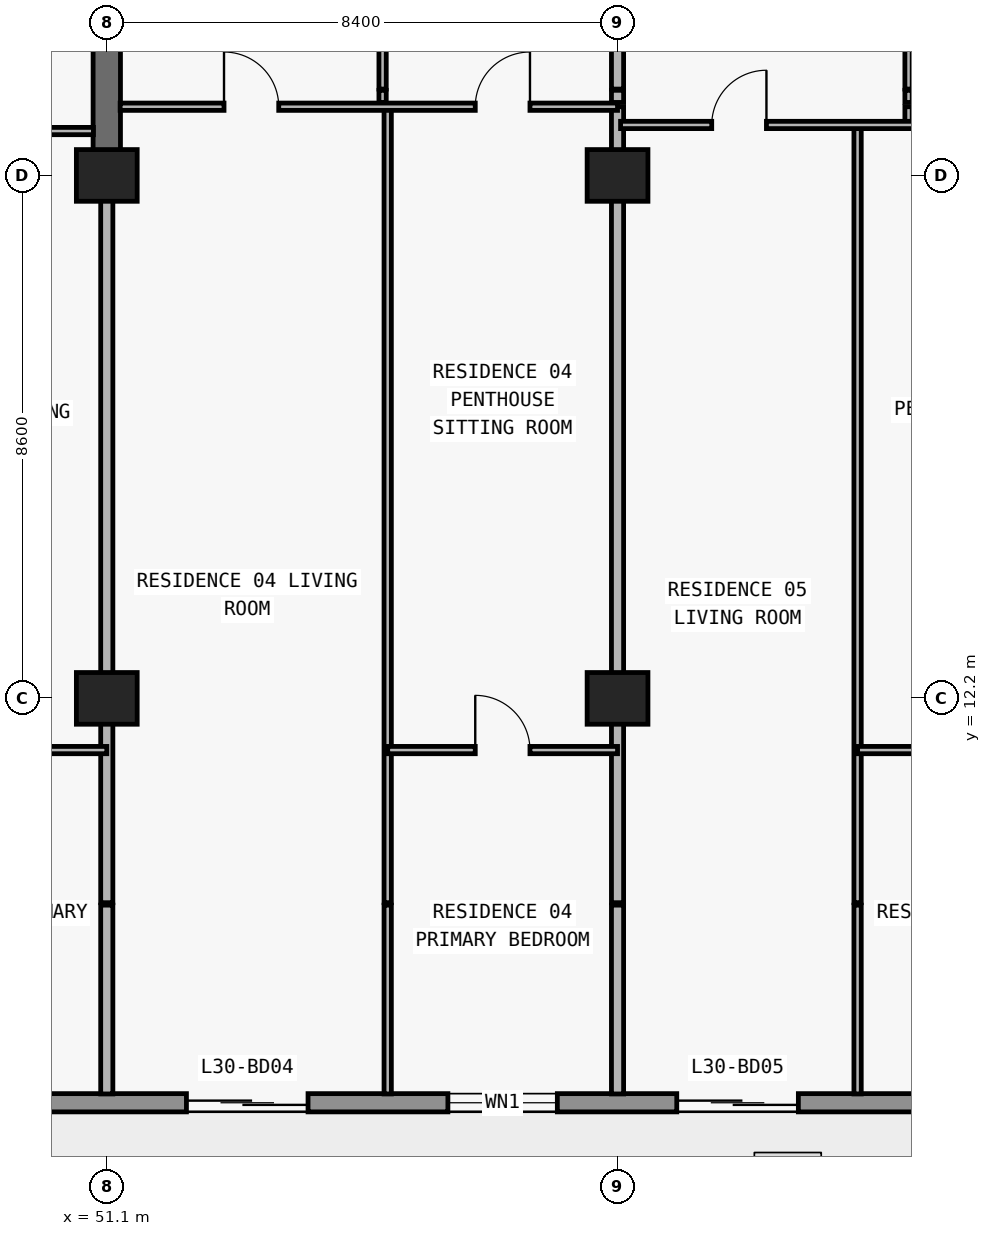
"""IFC4 building model, lengths in metres.
Left out: names, types, materials, properties, quantities, classifications, styles, units other than length and angle.
Written with IfcOpenShell. Run it as: python <this file> out.ifc"""

import sys

from ifc_helpers import new_model, si_unit, direction, frame, frame_2d, origin, origin_2d, place, context, subcontext, project, spatial, rectangle, extrude, element, fill, save


model = new_model("IFC4")
c1 = context("Model", 3, precision=1e-05, world=origin(), true_north=direction((0.0, 1.0)))
c2 = subcontext(c1, "Body", "Model", "MODEL_VIEW")
j1 = project(units=[si_unit("LENGTHUNIT", "METRE"), si_unit("PLANEANGLEUNIT", "RADIAN")], contexts=[c1])
p1 = place(None, origin())
s1 = spatial("IfcSite", under=j1, at=p1, CompositionType="ELEMENT")
p2 = place(p1, origin())
s2 = spatial("IfcBuilding", under=s1, at=p2, CompositionType="ELEMENT")
p3 = place(p2, frame((0.0, 0.0, 112.5)))
s3 = spatial("IfcBuildingStorey", under=s2, at=p3, CompositionType="ELEMENT", Elevation=112.5)
for number, where, z_axis, x_axis in (
    (1, (51.1, 12.2, 0.0), (0.0, 0.0, 1.0), (1.0, 0.0, 0.0)),
    (2, (59.5, 12.2, 0.0), (0.0, 0.0, 1.0), (1.0, 0.0, 0.0)),
    (3, (51.1, 20.8, 0.0), (0.0, 0.0, 1.0), (1.0, 0.0, 0.0)),
    (4, (59.5, 20.8, 0.0), (0.0, 0.0, 1.0), (1.0, 0.0, 0.0)),
):
    element("IfcColumn", number, at=place(p3, frame(where, z_axis=z_axis, x_axis=x_axis)), inside=s3, PredefinedType="COLUMN", context=c2, shape_type="SweptSolid", body=[
        extrude(rectangle(XDim=1.0, YDim=0.85, at=origin_2d()), origin(), (0.0, 0.0, 1.0), 3.05),
    ])
p4 = place(p3, frame((51.1, 20.8, 0.0), z_axis=(0.0, 0.0, 1.0), x_axis=(0.0, 1.0, 0.0)))
e5 = element("IfcWall", 5, at=p4, inside=s3, PredefinedType="SHEAR", context=c2, shape_type="SweptSolid", body=[
    extrude(rectangle(XDim=8.6, YDim=0.45, at=frame_2d((4.3, 0.0))), origin(), (0.0, 0.0, 1.0), 3.05),
])
p5 = place(p3, frame((70.1, 5.55, 0.0), z_axis=(0.0, 0.0, 1.0), x_axis=(-1.0, 0.0, 0.0)))
e6 = element("IfcWall", 6, at=p5, inside=s3, PredefinedType="STANDARD", context=c2, shape_type="SweptSolid", body=[
    extrude(rectangle(XDim=62.4, YDim=0.3, at=frame_2d((31.2, 0.0))), origin(), (0.0, 0.0, 1.0), 3.05),
])
p6 = place(p5, frame((57.29, 0.0, 0.0)))
e7 = element("IfcOpeningElement", 7, at=p6, cuts=e6, PredefinedType="OPENING", context=c2, shape_type="SweptSolid", body=[
    extrude(rectangle(XDim=2.0, YDim=2.3, at=frame_2d((1.0, 1.15))), frame((0.0, 0.16, 0.0), z_axis=(0.0, -1.0, 0.0), x_axis=(1.0, 0.0, 0.0)), (0.0, 0.0, 1.0), 0.32),
])
p7 = place(p5, frame((52.61, 0.0, 0.65)))
e8 = element("IfcOpeningElement", 8, at=p7, cuts=e6, PredefinedType="OPENING", context=c2, shape_type="SweptSolid", body=[
    extrude(rectangle(XDim=2.6, YDim=1.85, at=frame_2d((1.3, 0.925))), frame((0.0, 0.16, 0.0), z_axis=(0.0, -1.0, 0.0), x_axis=(1.0, 0.0, 0.0)), (0.0, 0.0, 1.0), 0.32),
])
p8 = place(p5, frame((46.5, 0.0, 0.85)))
e9 = element("IfcOpeningElement", 9, at=p8, cuts=e6, PredefinedType="OPENING", context=c2, shape_type="SweptSolid", body=[
    extrude(rectangle(XDim=2.2, YDim=1.55, at=frame_2d((1.1, 0.775))), frame((0.0, 0.16, 0.0), z_axis=(0.0, -1.0, 0.0), x_axis=(1.0, 0.0, 0.0)), (0.0, 0.0, 1.0), 0.32),
])
p9 = place(p5, frame((40.49, 0.0, 0.0)))
e10 = element("IfcOpeningElement", 10, at=p9, cuts=e6, PredefinedType="OPENING", context=c2, shape_type="SweptSolid", body=[
    extrude(rectangle(XDim=2.0, YDim=2.3, at=frame_2d((1.0, 1.15))), frame((0.0, 0.16, 0.0), z_axis=(0.0, -1.0, 0.0), x_axis=(1.0, 0.0, 0.0)), (0.0, 0.0, 1.0), 0.32),
])
p10 = place(p5, frame((35.81, 0.0, 0.65)))
e11 = element("IfcOpeningElement", 11, at=p10, cuts=e6, PredefinedType="OPENING", context=c2, shape_type="SweptSolid", body=[
    extrude(rectangle(XDim=2.6, YDim=1.85, at=frame_2d((1.3, 0.925))), frame((0.0, 0.16, 0.0), z_axis=(0.0, -1.0, 0.0), x_axis=(1.0, 0.0, 0.0)), (0.0, 0.0, 1.0), 0.32),
])
p11 = place(p5, frame((30.1, 0.0, 0.85)))
e12 = element("IfcOpeningElement", 12, at=p11, cuts=e6, PredefinedType="OPENING", context=c2, shape_type="SweptSolid", body=[
    extrude(rectangle(XDim=2.2, YDim=1.55, at=frame_2d((1.1, 0.775))), frame((0.0, 0.16, 0.0), z_axis=(0.0, -1.0, 0.0), x_axis=(1.0, 0.0, 0.0)), (0.0, 0.0, 1.0), 0.32),
])
p12 = place(p5, frame((24.426, 0.0, 0.0)))
e13 = element("IfcOpeningElement", 13, at=p12, cuts=e6, PredefinedType="OPENING", context=c2, shape_type="SweptSolid", body=[
    extrude(rectangle(XDim=2.0, YDim=2.3, at=frame_2d((1.0, 1.15))), frame((0.0, 0.16, 0.0), z_axis=(0.0, -1.0, 0.0), x_axis=(1.0, 0.0, 0.0)), (0.0, 0.0, 1.0), 0.32),
])
p13 = place(p5, frame((20.126, 0.0, 0.85)))
e14 = element("IfcOpeningElement", 14, at=p13, cuts=e6, PredefinedType="OPENING", context=c2, shape_type="SweptSolid", body=[
    extrude(rectangle(XDim=2.2, YDim=1.55, at=frame_2d((1.1, 0.775))), frame((0.0, 0.16, 0.0), z_axis=(0.0, -1.0, 0.0), x_axis=(1.0, 0.0, 0.0)), (0.0, 0.0, 1.0), 0.32),
])
p14 = place(p5, frame((15.69, 0.0, 0.0)))
e15 = element("IfcOpeningElement", 15, at=p14, cuts=e6, PredefinedType="OPENING", context=c2, shape_type="SweptSolid", body=[
    extrude(rectangle(XDim=2.0, YDim=2.3, at=frame_2d((1.0, 1.15))), frame((0.0, 0.16, 0.0), z_axis=(0.0, -1.0, 0.0), x_axis=(1.0, 0.0, 0.0)), (0.0, 0.0, 1.0), 0.32),
])
p15 = place(p5, frame((11.59, 0.0, 0.85)))
e16 = element("IfcOpeningElement", 16, at=p15, cuts=e6, PredefinedType="OPENING", context=c2, shape_type="SweptSolid", body=[
    extrude(rectangle(XDim=1.8, YDim=1.55, at=frame_2d((0.9, 0.775))), frame((0.0, 0.16, 0.0), z_axis=(0.0, -1.0, 0.0), x_axis=(1.0, 0.0, 0.0)), (0.0, 0.0, 1.0), 0.32),
])
p16 = place(p5, frame((7.626, 0.0, 0.0)))
e17 = element("IfcOpeningElement", 17, at=p16, cuts=e6, PredefinedType="OPENING", context=c2, shape_type="SweptSolid", body=[
    extrude(rectangle(XDim=2.0, YDim=2.3, at=frame_2d((1.0, 1.15))), frame((0.0, 0.16, 0.0), z_axis=(0.0, -1.0, 0.0), x_axis=(1.0, 0.0, 0.0)), (0.0, 0.0, 1.0), 0.32),
])
p17 = place(p5, frame((3.326, 0.0, 0.85)))
e18 = element("IfcOpeningElement", 18, at=p17, cuts=e6, PredefinedType="OPENING", context=c2, shape_type="SweptSolid", body=[
    extrude(rectangle(XDim=2.2, YDim=1.55, at=frame_2d((1.1, 0.775))), frame((0.0, 0.16, 0.0), z_axis=(0.0, -1.0, 0.0), x_axis=(1.0, 0.0, 0.0)), (0.0, 0.0, 1.0), 0.32),
])
p18 = place(p3, frame((51.1, 5.695, 0.0), z_axis=(0.0, 0.0, 1.0), x_axis=(0.0, 1.0, 0.0)))
e19 = element("IfcWall", 19, at=p18, inside=s3, PredefinedType="PARTITIONING", context=c2, shape_type="SweptSolid", body=[
    extrude(rectangle(XDim=3.105, YDim=0.2, at=frame_2d((1.552, 0.0))), origin(), (0.0, 0.0, 1.0), 3.05),
])
p19 = place(p3, frame((51.1, 8.84, 0.0), z_axis=(0.0, 0.0, 1.0), x_axis=(0.0, 1.0, 0.0)))
e20 = element("IfcWall", 20, at=p19, inside=s3, PredefinedType="PARTITIONING", context=c2, shape_type="SweptSolid", body=[
    extrude(rectangle(XDim=11.955, YDim=0.2, at=frame_2d((5.978, 0.0))), origin(), (0.0, 0.0, 1.0), 2.174),
])
p20 = place(p3, frame((55.636, 22.0, 0.0), z_axis=(0.0, 0.0, 1.0), x_axis=(0.0, 1.0, 0.0)))
e21 = element("IfcWall", 21, at=p20, inside=s3, PredefinedType="PARTITIONING", context=c2, shape_type="SweptSolid", body=[
    extrude(rectangle(XDim=0.2, YDim=0.12, at=frame_2d((0.1, 0.0))), origin(), (0.0, 0.0, 1.0), 3.05),
])
p21 = place(p3, frame((55.636, 22.22, 0.0), z_axis=(0.0, 0.0, 1.0), x_axis=(0.0, 1.0, 0.0)))
e22 = element("IfcWall", 22, at=p21, inside=s3, PredefinedType="PARTITIONING", context=c2, shape_type="SweptSolid", body=[
    extrude(rectangle(XDim=4.38, YDim=0.12, at=frame_2d((2.19, 0.0))), origin(), (0.0, 0.0, 1.0), 3.05),
])
p22 = place(p21, frame((1.74, 0.0, 0.0)))
e23 = element("IfcOpeningElement", 23, at=p22, cuts=e22, PredefinedType="OPENING", context=c2, shape_type="SweptSolid", body=[
    extrude(rectangle(XDim=0.9, YDim=2.15, at=frame_2d((0.45, 1.075))), frame((0.0, 0.07, 0.0), z_axis=(0.0, -1.0, 0.0), x_axis=(1.0, 0.0, 0.0)), (0.0, 0.0, 1.0), 0.14),
])
p23 = place(p3, frame((55.72, 5.695, 0.0), z_axis=(0.0, 0.0, 1.0), x_axis=(0.0, 1.0, 0.0)))
e24 = element("IfcWall", 24, at=p23, inside=s3, PredefinedType="PARTITIONING", context=c2, shape_type="SweptSolid", body=[
    extrude(rectangle(XDim=3.105, YDim=0.12, at=frame_2d((1.552, 0.0))), origin(), (0.0, 0.0, 1.0), 3.05),
])
p24 = place(p3, frame((55.72, 8.84, 0.0), z_axis=(0.0, 0.0, 1.0), x_axis=(0.0, 1.0, 0.0)))
e25 = element("IfcWall", 25, at=p24, inside=s3, PredefinedType="PARTITIONING", context=c2, shape_type="SweptSolid", body=[
    extrude(rectangle(XDim=13.09, YDim=0.12, at=frame_2d((6.545, 0.0))), origin(), (0.0, 0.0, 1.0), 3.05),
])
p25 = place(p3, frame((59.5, 5.695, 0.0), z_axis=(0.0, 0.0, 1.0), x_axis=(0.0, 1.0, 0.0)))
e26 = element("IfcWall", 26, at=p25, inside=s3, PredefinedType="PARTITIONING", context=c2, shape_type="SweptSolid", body=[
    extrude(rectangle(XDim=3.105, YDim=0.2, at=frame_2d((1.552, 0.0))), origin(), (0.0, 0.0, 1.0), 3.05),
])
p26 = place(p3, frame((59.5, 8.84, 0.0), z_axis=(0.0, 0.0, 1.0), x_axis=(0.0, 1.0, 0.0)))
e27 = element("IfcWall", 27, at=p26, inside=s3, PredefinedType="PARTITIONING", context=c2, shape_type="SweptSolid", body=[
    extrude(rectangle(XDim=13.09, YDim=0.2, at=frame_2d((6.545, 0.0))), origin(), (0.0, 0.0, 1.0), 2.174),
])
p27 = place(p3, frame((59.5, 22.0, 0.0), z_axis=(0.0, 0.0, 1.0), x_axis=(0.0, 1.0, 0.0)))
e28 = element("IfcWall", 28, at=p27, inside=s3, PredefinedType="PARTITIONING", context=c2, shape_type="SweptSolid", body=[
    extrude(rectangle(XDim=0.2, YDim=0.2, at=frame_2d((0.1, 0.0))), origin(), (0.0, 0.0, 1.0), 2.174),
])
p28 = place(p3, frame((59.5, 22.22, 0.0), z_axis=(0.0, 0.0, 1.0), x_axis=(0.0, 1.0, 0.0)))
e29 = element("IfcWall", 29, at=p28, inside=s3, PredefinedType="PARTITIONING", context=c2, shape_type="SweptSolid", body=[
    extrude(rectangle(XDim=4.38, YDim=0.2, at=frame_2d((2.19, 0.0))), origin(), (0.0, 0.0, 1.0), 2.174),
])
p29 = place(p3, frame((63.448, 5.695, 0.0), z_axis=(0.0, 0.0, 1.0), x_axis=(0.0, 1.0, 0.0)))
e30 = element("IfcWall", 30, at=p29, inside=s3, PredefinedType="PARTITIONING", context=c2, shape_type="SweptSolid", body=[
    extrude(rectangle(XDim=3.105, YDim=0.12, at=frame_2d((1.552, 0.0))), origin(), (0.0, 0.0, 1.0), 3.05),
])
p30 = place(p3, frame((63.448, 8.84, 0.0), z_axis=(0.0, 0.0, 1.0), x_axis=(0.0, 1.0, 0.0)))
e31 = element("IfcWall", 31, at=p30, inside=s3, PredefinedType="PARTITIONING", context=c2, shape_type="SweptSolid", body=[
    extrude(rectangle(XDim=12.79, YDim=0.12, at=frame_2d((6.395, 0.0))), origin(), (0.0, 0.0, 1.0), 3.05),
])
p31 = place(p3, frame((64.286, 21.63, 0.0), z_axis=(0.0, 0.0, 1.0), x_axis=(0.0, 1.0, 0.0)))
e32 = element("IfcWall", 32, at=p31, inside=s3, PredefinedType="PARTITIONING", context=c2, shape_type="SweptSolid", body=[
    extrude(rectangle(XDim=0.3, YDim=0.12, at=frame_2d((0.15, 0.0))), origin(), (0.0, 0.0, 1.0), 3.05),
])
p32 = place(p3, frame((64.286, 22.0, 0.0), z_axis=(0.0, 0.0, 1.0), x_axis=(0.0, 1.0, 0.0)))
e33 = element("IfcWall", 33, at=p32, inside=s3, PredefinedType="PARTITIONING", context=c2, shape_type="SweptSolid", body=[
    extrude(rectangle(XDim=0.2, YDim=0.12, at=frame_2d((0.1, 0.0))), origin(), (0.0, 0.0, 1.0), 3.05),
])
p33 = place(p3, frame((64.286, 22.22, 0.0), z_axis=(0.0, 0.0, 1.0), x_axis=(0.0, 1.0, 0.0)))
e34 = element("IfcWall", 34, at=p33, inside=s3, PredefinedType="PARTITIONING", context=c2, shape_type="SweptSolid", body=[
    extrude(rectangle(XDim=4.38, YDim=0.12, at=frame_2d((2.19, 0.0))), origin(), (0.0, 0.0, 1.0), 3.05),
])
p34 = place(p33, frame((1.74, 0.0, 0.0)))
e35 = element("IfcOpeningElement", 35, at=p34, cuts=e34, PredefinedType="OPENING", context=c2, shape_type="SweptSolid", body=[
    extrude(rectangle(XDim=0.9, YDim=2.15, at=frame_2d((0.45, 1.075))), frame((0.0, 0.07, 0.0), z_axis=(0.0, -1.0, 0.0), x_axis=(1.0, 0.0, 0.0)), (0.0, 0.0, 1.0), 0.14),
])
p35 = place(p3, frame((46.648, 11.35, 0.0), z_axis=(0.0, 0.0, 1.0), x_axis=(1.0, 0.0, 0.0)))
e36 = element("IfcWall", 36, at=p35, inside=s3, PredefinedType="PARTITIONING", context=c2, shape_type="SweptSolid", body=[
    extrude(rectangle(XDim=4.452, YDim=0.12, at=frame_2d((2.226, 0.0))), origin(), (0.0, 0.0, 1.0), 3.05),
])
p36 = place(p35, frame((1.776, 0.0, 0.0)))
e37 = element("IfcOpeningElement", 37, at=p36, cuts=e36, PredefinedType="OPENING", context=c2, shape_type="SweptSolid", body=[
    extrude(rectangle(XDim=0.9, YDim=2.15, at=frame_2d((0.45, 1.075))), frame((0.0, 0.07, 0.0), z_axis=(0.0, -1.0, 0.0), x_axis=(1.0, 0.0, 0.0)), (0.0, 0.0, 1.0), 0.14),
])
p37 = place(p3, frame((55.72, 11.35, 0.0), z_axis=(0.0, 0.0, 1.0), x_axis=(1.0, 0.0, 0.0)))
e38 = element("IfcWall", 38, at=p37, inside=s3, PredefinedType="PARTITIONING", context=c2, shape_type="SweptSolid", body=[
    extrude(rectangle(XDim=3.78, YDim=0.12, at=frame_2d((1.89, 0.0))), origin(), (0.0, 0.0, 1.0), 3.05),
])
p38 = place(p37, frame((1.44, 0.0, 0.0)))
e39 = element("IfcOpeningElement", 39, at=p38, cuts=e38, PredefinedType="OPENING", context=c2, shape_type="SweptSolid", body=[
    extrude(rectangle(XDim=0.9, YDim=2.15, at=frame_2d((0.45, 1.075))), frame((0.0, 0.07, 0.0), z_axis=(0.0, -1.0, 0.0), x_axis=(1.0, 0.0, 0.0)), (0.0, 0.0, 1.0), 0.14),
])
p39 = place(p3, frame((63.448, 11.35, 0.0), z_axis=(0.0, 0.0, 1.0), x_axis=(1.0, 0.0, 0.0)))
e40 = element("IfcWall", 40, at=p39, inside=s3, PredefinedType="PARTITIONING", context=c2, shape_type="SweptSolid", body=[
    extrude(rectangle(XDim=4.452, YDim=0.12, at=frame_2d((2.226, 0.0))), origin(), (0.0, 0.0, 1.0), 3.05),
])
p40 = place(p39, frame((1.776, 0.0, 0.0)))
e41 = element("IfcOpeningElement", 41, at=p40, cuts=e40, PredefinedType="OPENING", context=c2, shape_type="SweptSolid", body=[
    extrude(rectangle(XDim=0.9, YDim=2.15, at=frame_2d((0.45, 1.075))), frame((0.0, 0.07, 0.0), z_axis=(0.0, -1.0, 0.0), x_axis=(1.0, 0.0, 0.0)), (0.0, 0.0, 1.0), 0.14),
])
p41 = place(p3, frame((42.7, 21.53, 0.0), z_axis=(0.0, 0.0, 1.0), x_axis=(1.0, 0.0, 0.0)))
e42 = element("IfcWall", 42, at=p41, inside=s3, PredefinedType="PARTITIONING", context=c2, shape_type="SweptSolid", body=[
    extrude(rectangle(XDim=8.18, YDim=0.12, at=frame_2d((4.09, 0.0))), origin(), (0.0, 0.0, 1.0), 3.05),
])
p42 = place(p41, frame((1.524, 0.0, 0.0)))
e43 = element("IfcOpeningElement", 43, at=p42, cuts=e42, PredefinedType="OPENING", context=c2, shape_type="SweptSolid", body=[
    extrude(rectangle(XDim=0.9, YDim=2.15, at=frame_2d((0.45, 1.075))), frame((0.0, 0.07, 0.0), z_axis=(0.0, -1.0, 0.0), x_axis=(1.0, 0.0, 0.0)), (0.0, 0.0, 1.0), 0.14),
])
p43 = place(p41, frame((5.783, 0.0, 0.0)))
e44 = element("IfcOpeningElement", 44, at=p43, cuts=e42, PredefinedType="OPENING", context=c2, shape_type="SweptSolid", body=[
    extrude(rectangle(XDim=0.9, YDim=2.15, at=frame_2d((0.45, 1.075))), frame((0.0, 0.07, 0.0), z_axis=(0.0, -1.0, 0.0), x_axis=(1.0, 0.0, 0.0)), (0.0, 0.0, 1.0), 0.14),
])
p44 = place(p3, frame((59.55, 21.63, 0.0), z_axis=(0.0, 0.0, 1.0), x_axis=(1.0, 0.0, 0.0)))
e45 = element("IfcWall", 45, at=p44, inside=s3, PredefinedType="PARTITIONING", context=c2, shape_type="SweptSolid", body=[
    extrude(rectangle(XDim=8.35, YDim=0.12, at=frame_2d((4.175, 0.0))), origin(), (0.0, 0.0, 1.0), 3.05),
])
p45 = place(p44, frame((1.499, 0.0, 0.0)))
e46 = element("IfcOpeningElement", 46, at=p45, cuts=e45, PredefinedType="OPENING", context=c2, shape_type="SweptSolid", body=[
    extrude(rectangle(XDim=0.9, YDim=2.15, at=frame_2d((0.45, 1.075))), frame((0.0, 0.07, 0.0), z_axis=(0.0, -1.0, 0.0), x_axis=(1.0, 0.0, 0.0)), (0.0, 0.0, 1.0), 0.14),
])
p46 = place(p44, frame((6.093, 0.0, 0.0)))
e47 = element("IfcOpeningElement", 47, at=p46, cuts=e45, PredefinedType="OPENING", context=c2, shape_type="SweptSolid", body=[
    extrude(rectangle(XDim=0.9, YDim=2.15, at=frame_2d((0.45, 1.075))), frame((0.0, 0.07, 0.0), z_axis=(0.0, -1.0, 0.0), x_axis=(1.0, 0.0, 0.0)), (0.0, 0.0, 1.0), 0.14),
])
p47 = place(p3, frame((51.32, 21.93, 0.0), z_axis=(0.0, 0.0, 1.0), x_axis=(1.0, 0.0, 0.0)))
e48 = element("IfcWall", 48, at=p47, inside=s3, PredefinedType="PARTITIONING", context=c2, shape_type="SweptSolid", body=[
    extrude(rectangle(XDim=8.18, YDim=0.12, at=frame_2d((4.09, 0.0))), origin(), (0.0, 0.0, 1.0), 3.05),
])
p48 = place(p47, frame((1.708, 0.0, 0.0)))
e49 = element("IfcOpeningElement", 49, at=p48, cuts=e48, PredefinedType="OPENING", context=c2, shape_type="SweptSolid", body=[
    extrude(rectangle(XDim=0.9, YDim=2.15, at=frame_2d((0.45, 1.075))), frame((0.0, 0.07, 0.0), z_axis=(0.0, -1.0, 0.0), x_axis=(1.0, 0.0, 0.0)), (0.0, 0.0, 1.0), 0.14),
])
p49 = place(p47, frame((5.84, 0.0, 0.0)))
e50 = element("IfcOpeningElement", 50, at=p49, cuts=e48, PredefinedType="OPENING", context=c2, shape_type="SweptSolid", body=[
    extrude(rectangle(XDim=0.9, YDim=2.15, at=frame_2d((0.45, 1.075))), frame((0.0, 0.07, 0.0), z_axis=(0.0, -1.0, 0.0), x_axis=(1.0, 0.0, 0.0)), (0.0, 0.0, 1.0), 0.14),
])
p50 = place(p14, origin())
e51 = element("IfcDoor", 51, at=p50, inside=s3, OperationType="DOUBLE_DOOR_SLIDING", PredefinedType="DOOR", context=c2, shape_type="SweptSolid", body=[
    extrude(rectangle(XDim=2.0, YDim=2.3, at=frame_2d((1.0, 1.15))), frame((0.0, 0.025, 0.0), z_axis=(0.0, -1.0, 0.0), x_axis=(1.0, 0.0, 0.0)), (0.0, 0.0, 1.0), 0.05),
])
fill(e15, e51)
p51 = place(p15, origin())
e52 = element("IfcWindow", 52, at=p51, inside=s3, PartitioningType="SINGLE_PANEL", PredefinedType="WINDOW", context=c2, shape_type="SweptSolid", body=[
    extrude(rectangle(XDim=1.8, YDim=1.55, at=frame_2d((0.9, 0.775))), frame((0.0, 0.03, 0.0), z_axis=(0.0, -1.0, 0.0), x_axis=(1.0, 0.0, 0.0)), (0.0, 0.0, 1.0), 0.06),
])
fill(e16, e52)
p52 = place(p16, origin())
e53 = element("IfcDoor", 53, at=p52, inside=s3, OperationType="DOUBLE_DOOR_SLIDING", PredefinedType="DOOR", context=c2, shape_type="SweptSolid", body=[
    extrude(rectangle(XDim=2.0, YDim=2.3, at=frame_2d((1.0, 1.15))), frame((0.0, 0.025, 0.0), z_axis=(0.0, -1.0, 0.0), x_axis=(1.0, 0.0, 0.0)), (0.0, 0.0, 1.0), 0.05),
])
fill(e17, e53)
p53 = place(p48, origin())
e54 = element("IfcDoor", 54, at=p53, inside=s3, OperationType="SINGLE_SWING_LEFT", PredefinedType="DOOR", context=c2, shape_type="SweptSolid", body=[
    extrude(rectangle(XDim=0.9, YDim=2.15, at=frame_2d((0.45, 1.075))), frame((0.0, 0.025, 0.0), z_axis=(0.0, -1.0, 0.0), x_axis=(1.0, 0.0, 0.0)), (0.0, 0.0, 1.0), 0.05),
])
fill(e49, e54)
p54 = place(p49, origin())
e55 = element("IfcDoor", 55, at=p54, inside=s3, OperationType="SINGLE_SWING_RIGHT", PredefinedType="DOOR", context=c2, shape_type="SweptSolid", body=[
    extrude(rectangle(XDim=0.9, YDim=2.15, at=frame_2d((0.45, 1.075))), frame((0.0, 0.025, 0.0), z_axis=(0.0, -1.0, 0.0), x_axis=(1.0, 0.0, 0.0)), (0.0, 0.0, 1.0), 0.05),
])
fill(e50, e55)
p55 = place(p38, origin())
e56 = element("IfcDoor", 56, at=p55, inside=s3, OperationType="SINGLE_SWING_LEFT", PredefinedType="DOOR", context=c2, shape_type="SweptSolid", body=[
    extrude(rectangle(XDim=0.9, YDim=2.15, at=frame_2d((0.45, 1.075))), frame((0.0, 0.025, 0.0), z_axis=(0.0, -1.0, 0.0), x_axis=(1.0, 0.0, 0.0)), (0.0, 0.0, 1.0), 0.05),
])
fill(e39, e56)
p56 = place(p45, origin())
e57 = element("IfcDoor", 57, at=p56, inside=s3, OperationType="SINGLE_SWING_RIGHT", PredefinedType="DOOR", context=c2, shape_type="SweptSolid", body=[
    extrude(rectangle(XDim=0.9, YDim=2.15, at=frame_2d((0.45, 1.075))), frame((0.0, 0.025, 0.0), z_axis=(0.0, -1.0, 0.0), x_axis=(1.0, 0.0, 0.0)), (0.0, 0.0, 1.0), 0.05),
])
fill(e46, e57)
save(model, sys.argv[1])
